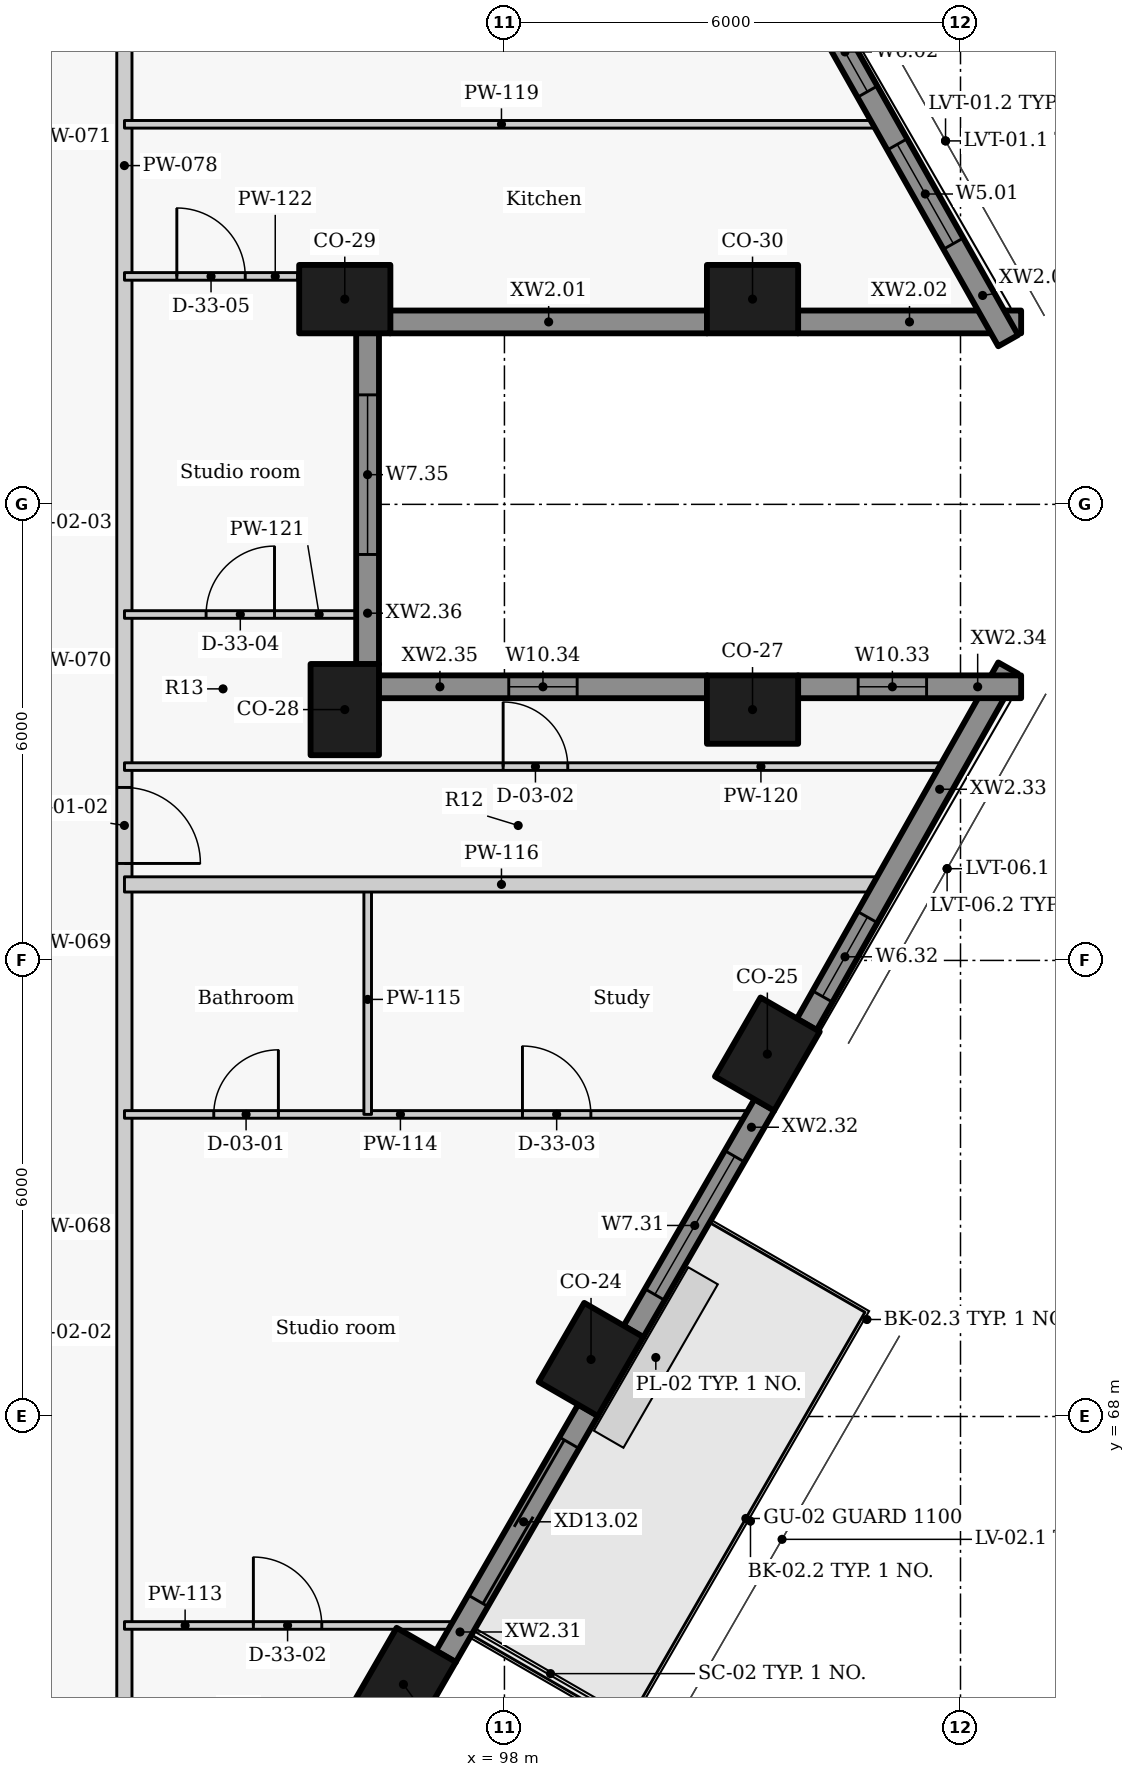
"""IFC4 building model, lengths in metres.
Left out: names, types, materials, properties, quantities, classifications, styles, units other than length and angle.
Written with IfcOpenShell. Run it as: python <this file> out.ifc"""

import sys

from ifc_helpers import new_model, si_unit, direction, frame, frame_2d, origin, origin_2d, place, context, subcontext, project, spatial, rectangle, extrude, element, fill, save


model = new_model("IFC4")
c1 = context("Model", 3, precision=1e-05, world=origin(), true_north=direction((0.0, 1.0)))
c2 = subcontext(c1, "Body", "Model", "MODEL_VIEW")
j1 = project(units=[si_unit("LENGTHUNIT", "METRE"), si_unit("PLANEANGLEUNIT", "RADIAN")], contexts=[c1])
p1 = place(None, origin())
s1 = spatial("IfcSite", under=j1, at=p1, CompositionType="ELEMENT")
p2 = place(p1, origin())
s2 = spatial("IfcBuilding", under=s1, at=p2, CompositionType="ELEMENT")
p3 = place(p2, frame((0.0, 0.0, 183.3)))
s3 = spatial("IfcBuildingStorey", under=s2, at=p3, CompositionType="ELEMENT", Elevation=183.3)
for number, where, z_axis, x_axis in (
    (1, (96.671, 64.475, 0.0), (0.0, 0.0, 1.0), (0.5, 0.866, 0.0)),
    (2, (99.139, 68.75, 0.0), (0.0, 0.0, 1.0), (0.5, 0.866, 0.0)),
    (3, (101.459, 72.768, 0.0), (0.0, 0.0, 1.0), (0.5, 0.866, 0.0)),
    (4, (101.264, 77.3, 0.0), (0.0, 0.0, 1.0), (-1.0, 0.0, 0.0)),
    (5, (95.899, 77.3, 0.0), (0.0, 0.0, 1.0), (0.0, 1.0, 0.0)),
    (6, (95.899, 82.7, 0.0), (0.0, 0.0, 1.0), (1.0, 0.0, 0.0)),
    (7, (101.264, 82.7, 0.0), (0.0, 0.0, 1.0), (1.0, 0.0, 0.0)),
):
    element("IfcColumn", number, at=place(p3, frame(where, z_axis=z_axis, x_axis=x_axis)), inside=s3, PredefinedType="COLUMN", context=c2, shape_type="SweptSolid", body=[
        extrude(rectangle(XDim=1.2, YDim=0.9, at=origin_2d()), origin(), (0.0, 0.0, 1.0), 3.3),
    ])
p4 = place(p3, frame((96.496, 82.4, 0.0), z_axis=(0.0, 0.0, 1.0), x_axis=(1.0, 0.0, 0.0)))
e8 = element("IfcWall", 8, at=p4, inside=s3, PredefinedType="SOLIDWALL", context=c2, shape_type="SweptSolid", body=[
    extrude(rectangle(XDim=4.172, YDim=0.3, at=frame_2d((2.086, 0.0))), origin(), (0.0, 0.0, 1.0), 2.425),
])
p5 = place(p3, frame((101.86, 82.4, 0.0), z_axis=(0.0, 0.0, 1.0), x_axis=(1.0, 0.0, 0.0)))
e9 = element("IfcWall", 9, at=p5, inside=s3, PredefinedType="SOLIDWALL", context=c2, shape_type="SweptSolid", body=[
    extrude(rectangle(XDim=2.938, YDim=0.3, at=frame_2d((1.469, 0.0))), origin(), (0.0, 0.0, 1.0), 2.425),
])
p6 = place(p3, frame((104.627, 82.154, 0.0), z_axis=(0.0, 0.0, 1.0), x_axis=(-0.492033360928, 0.870576344575, 0.0)))
e10 = element("IfcWall", 10, at=p6, inside=s3, PredefinedType="SOLIDWALL", context=c2, shape_type="SweptSolid", body=[
    extrude(rectangle(XDim=5.387, YDim=0.3, at=frame_2d((2.693, 0.0))), origin(), (0.0, 0.0, 1.0), 2.425),
])
p7 = place(p6, frame((1.466, 0.0, 0.9)))
e11 = element("IfcOpeningElement", 11, at=p7, cuts=e10, PredefinedType="OPENING", context=c2, shape_type="SweptSolid", body=[
    extrude(rectangle(XDim=1.5, YDim=1.1, at=frame_2d((0.75, 0.55))), frame((0.0, 0.16, 0.0), z_axis=(0.0, -1.0, 0.0), x_axis=(1.0, 0.0, 0.0)), (0.0, 0.0, 1.0), 0.32),
])
p8 = place(p6, frame((3.763, 0.0, 0.9)))
e12 = element("IfcOpeningElement", 12, at=p8, cuts=e10, PredefinedType="OPENING", context=c2, shape_type="SweptSolid", body=[
    extrude(rectangle(XDim=1.2, YDim=1.1, at=frame_2d((0.6, 0.55))), frame((0.0, 0.16, 0.0), z_axis=(0.0, -1.0, 0.0), x_axis=(1.0, 0.0, 0.0)), (0.0, 0.0, 1.0), 0.32),
])
p9 = place(p3, frame((97.229, 64.842, 0.0), z_axis=(0.0, 0.0, 1.0), x_axis=(0.500059225181, 0.86599120741, 0.0)))
e13 = element("IfcWall", 13, at=p9, inside=s3, PredefinedType="SOLIDWALL", context=c2, shape_type="SweptSolid", body=[
    extrude(rectangle(XDim=3.744, YDim=0.3, at=frame_2d((1.872, 0.0))), origin(), (0.0, 0.0, 1.0), 2.425),
])
p10 = place(p9, frame((0.847, 0.0, 0.0)))
e14 = element("IfcOpeningElement", 14, at=p10, cuts=e13, PredefinedType="OPENING", context=c2, shape_type="SweptSolid", body=[
    extrude(rectangle(XDim=2.4, YDim=2.0, at=frame_2d((1.2, 1.0))), frame((0.0, 0.16, 0.0), z_axis=(0.0, -1.0, 0.0), x_axis=(1.0, 0.0, 0.0)), (0.0, 0.0, 1.0), 0.32),
])
p11 = place(p3, frame((99.697, 69.116, 0.0), z_axis=(0.0, 0.0, 1.0), x_axis=(0.499955427682, 0.866051136095, 0.0)))
e15 = element("IfcWall", 15, at=p11, inside=s3, PredefinedType="SOLIDWALL", context=c2, shape_type="SweptSolid", body=[
    extrude(rectangle(XDim=3.447, YDim=0.3, at=frame_2d((1.724, 0.0))), origin(), (0.0, 0.0, 1.0), 2.425),
])
p12 = place(p11, frame((0.563, 0.0, 0.9)))
e16 = element("IfcOpeningElement", 16, at=p12, cuts=e15, PredefinedType="OPENING", context=c2, shape_type="SweptSolid", body=[
    extrude(rectangle(XDim=2.1, YDim=1.1, at=frame_2d((1.05, 0.55))), frame((0.0, 0.16, 0.0), z_axis=(0.0, -1.0, 0.0), x_axis=(1.0, 0.0, 0.0)), (0.0, 0.0, 1.0), 0.32),
])
p13 = place(p3, frame((101.977, 73.157, 0.0), z_axis=(0.0, 0.0, 1.0), x_axis=(0.492033360928, 0.870576344575, 0.0)))
e17 = element("IfcWall", 17, at=p13, inside=s3, PredefinedType="SOLIDWALL", context=c2, shape_type="SweptSolid", body=[
    extrude(rectangle(XDim=5.387, YDim=0.3, at=frame_2d((2.693, 0.0))), origin(), (0.0, 0.0, 1.0), 2.425),
])
p14 = place(p13, frame((0.423, 0.0, 0.9)))
e18 = element("IfcOpeningElement", 18, at=p14, cuts=e17, PredefinedType="OPENING", context=c2, shape_type="SweptSolid", body=[
    extrude(rectangle(XDim=1.2, YDim=1.1, at=frame_2d((0.6, 0.55))), frame((0.0, 0.16, 0.0), z_axis=(0.0, -1.0, 0.0), x_axis=(1.0, 0.0, 0.0)), (0.0, 0.0, 1.0), 0.32),
])
p15 = place(p3, frame((104.798, 77.6, 0.0), z_axis=(0.0, 0.0, 1.0), x_axis=(-1.0, 0.0, 0.0)))
e19 = element("IfcWall", 19, at=p15, inside=s3, PredefinedType="SOLIDWALL", context=c2, shape_type="SweptSolid", body=[
    extrude(rectangle(XDim=2.938, YDim=0.3, at=frame_2d((1.469, 0.0))), origin(), (0.0, 0.0, 1.0), 2.425),
])
p16 = place(p15, frame((1.244, 0.0, 1.5)))
e20 = element("IfcOpeningElement", 20, at=p16, cuts=e19, PredefinedType="OPENING", context=c2, shape_type="SweptSolid", body=[
    extrude(rectangle(XDim=0.9, YDim=0.5, at=frame_2d((0.45, 0.25))), frame((0.0, 0.16, 0.0), z_axis=(0.0, -1.0, 0.0), x_axis=(1.0, 0.0, 0.0)), (0.0, 0.0, 1.0), 0.32),
])
p17 = place(p3, frame((100.668, 77.6, 0.0), z_axis=(0.0, 0.0, 1.0), x_axis=(-1.0, 0.0, 0.0)))
e21 = element("IfcWall", 21, at=p17, inside=s3, PredefinedType="SOLIDWALL", context=c2, shape_type="SweptSolid", body=[
    extrude(rectangle(XDim=4.323, YDim=0.3, at=frame_2d((2.161, 0.0))), origin(), (0.0, 0.0, 1.0), 2.425),
])
p18 = place(p17, frame((1.711, 0.0, 1.5)))
e22 = element("IfcOpeningElement", 22, at=p18, cuts=e21, PredefinedType="OPENING", context=c2, shape_type="SweptSolid", body=[
    extrude(rectangle(XDim=0.9, YDim=0.5, at=frame_2d((0.45, 0.25))), frame((0.0, 0.16, 0.0), z_axis=(0.0, -1.0, 0.0), x_axis=(1.0, 0.0, 0.0)), (0.0, 0.0, 1.0), 0.32),
])
p19 = place(p3, frame((96.199, 77.896, 0.0), z_axis=(0.0, 0.0, 1.0), x_axis=(0.0, 1.0, 0.0)))
e23 = element("IfcWall", 23, at=p19, inside=s3, PredefinedType="SOLIDWALL", context=c2, shape_type="SweptSolid", body=[
    extrude(rectangle(XDim=4.358, YDim=0.3, at=frame_2d((2.179, 0.0))), origin(), (0.0, 0.0, 1.0), 2.425),
])
p20 = place(p19, frame((1.445, 0.0, 0.9)))
e24 = element("IfcOpeningElement", 24, at=p20, cuts=e23, PredefinedType="OPENING", context=c2, shape_type="SweptSolid", body=[
    extrude(rectangle(XDim=2.1, YDim=1.1, at=frame_2d((1.05, 0.55))), frame((0.0, 0.16, 0.0), z_axis=(0.0, -1.0, 0.0), x_axis=(1.0, 0.0, 0.0)), (0.0, 0.0, 1.0), 0.32),
])
p21 = place(p3, frame((93.0, 101.281, 0.0), z_axis=(0.0, 0.0, 1.0), x_axis=(0.0, -1.0, 0.0)))
e25 = element("IfcWall", 25, at=p21, inside=s3, PredefinedType="PARTITIONING", context=c2, shape_type="SweptSolid", body=[
    extrude(rectangle(XDim=42.606, YDim=0.2, at=frame_2d((21.303, 0.0))), origin(), (0.0, 0.0, 1.0), 2.405),
])
p22 = place(p21, frame((39.33, 0.0, 0.0)))
e26 = element("IfcOpeningElement", 26, at=p22, cuts=e25, PredefinedType="OPENING", context=c2, shape_type="SweptSolid", body=[
    extrude(rectangle(XDim=1.0, YDim=2.1, at=frame_2d((0.5, 1.05))), frame((0.0, 0.11, 0.0), z_axis=(0.0, -1.0, 0.0), x_axis=(1.0, 0.0, 0.0)), (0.0, 0.0, 1.0), 0.22),
])
p23 = place(p21, frame((25.005, 0.0, 0.0)))
e27 = element("IfcOpeningElement", 27, at=p23, cuts=e25, PredefinedType="OPENING", context=c2, shape_type="SweptSolid", body=[
    extrude(rectangle(XDim=1.0, YDim=2.1, at=frame_2d((0.5, 1.05))), frame((0.0, 0.11, 0.0), z_axis=(0.0, -1.0, 0.0), x_axis=(1.0, 0.0, 0.0)), (0.0, 0.0, 1.0), 0.22),
])
p24 = place(p21, frame((7.643, 0.0, 0.0)))
e28 = element("IfcOpeningElement", 28, at=p24, cuts=e25, PredefinedType="OPENING", context=c2, shape_type="SweptSolid", body=[
    extrude(rectangle(XDim=1.0, YDim=2.1, at=frame_2d((0.5, 1.05))), frame((0.0, 0.11, 0.0), z_axis=(0.0, -1.0, 0.0), x_axis=(1.0, 0.0, 0.0)), (0.0, 0.0, 1.0), 0.22),
])
p25 = place(p3, frame((93.001, 65.251, 0.0), z_axis=(0.0, 0.0, 1.0), x_axis=(1.0, 0.0, 0.0)))
e29 = element("IfcWall", 29, at=p25, inside=s3, PredefinedType="PARTITIONING", context=c2, shape_type="SweptSolid", body=[
    extrude(rectangle(XDim=4.291, YDim=0.1, at=frame_2d((2.146, 0.0))), origin(), (0.0, 0.0, 1.0), 2.405),
])
p26 = place(p25, frame((1.696, 0.0, 0.0)))
e30 = element("IfcOpeningElement", 30, at=p26, cuts=e29, PredefinedType="OPENING", context=c2, shape_type="SweptSolid", body=[
    extrude(rectangle(XDim=0.9, YDim=2.1, at=frame_2d((0.45, 1.05))), frame((0.0, 0.06, 0.0), z_axis=(0.0, -1.0, 0.0), x_axis=(1.0, 0.0, 0.0)), (0.0, 0.0, 1.0), 0.12),
])
p27 = place(p3, frame((93.001, 71.974, 0.0), z_axis=(0.0, 0.0, 1.0), x_axis=(1.0, 0.0, 0.0)))
e31 = element("IfcWall", 31, at=p27, inside=s3, PredefinedType="PARTITIONING", context=c2, shape_type="SweptSolid", body=[
    extrude(rectangle(XDim=8.173, YDim=0.1, at=frame_2d((4.086, 0.0))), origin(), (0.0, 0.0, 1.0), 2.405),
])
p28 = place(p27, frame((1.175, 0.0, 0.0)))
e32 = element("IfcOpeningElement", 32, at=p28, cuts=e31, PredefinedType="OPENING", context=c2, shape_type="SweptSolid", body=[
    extrude(rectangle(XDim=0.85, YDim=2.1, at=frame_2d((0.425, 1.05))), frame((0.0, 0.06, 0.0), z_axis=(0.0, -1.0, 0.0), x_axis=(1.0, 0.0, 0.0)), (0.0, 0.0, 1.0), 0.12),
])
p29 = place(p27, frame((5.236, 0.0, 0.0)))
e33 = element("IfcOpeningElement", 33, at=p29, cuts=e31, PredefinedType="OPENING", context=c2, shape_type="SweptSolid", body=[
    extrude(rectangle(XDim=0.9, YDim=2.1, at=frame_2d((0.45, 1.05))), frame((0.0, 0.06, 0.0), z_axis=(0.0, -1.0, 0.0), x_axis=(1.0, 0.0, 0.0)), (0.0, 0.0, 1.0), 0.12),
])
p30 = place(p3, frame((96.201, 71.974, 0.0), z_axis=(0.0, 0.0, 1.0), x_axis=(0.0, 1.0, 0.0)))
e34 = element("IfcWall", 34, at=p30, inside=s3, PredefinedType="PARTITIONING", context=c2, shape_type="SweptSolid", body=[
    extrude(rectangle(XDim=3.026, YDim=0.1, at=frame_2d((1.513, 0.0))), origin(), (0.0, 0.0, 1.0), 3.025),
])
p31 = place(p3, frame((93.001, 75.0, 0.0), z_axis=(0.0, 0.0, 1.0), x_axis=(1.0, 0.0, 0.0)))
e35 = element("IfcWall", 35, at=p31, inside=s3, PredefinedType="PARTITIONING", context=c2, shape_type="SweptSolid", body=[
    extrude(rectangle(XDim=9.919, YDim=0.2, at=frame_2d((4.96, 0.0))), origin(), (0.0, 0.0, 1.0), 2.405),
])
p32 = place(p3, frame((93.001, 85.0, 0.0), z_axis=(0.0, 0.0, 1.0), x_axis=(1.0, 0.0, 0.0)))
e36 = element("IfcWall", 36, at=p32, inside=s3, PredefinedType="PARTITIONING", context=c2, shape_type="SweptSolid", body=[
    extrude(rectangle(XDim=9.92, YDim=0.1, at=frame_2d((4.96, 0.0))), origin(), (0.0, 0.0, 1.0), 2.405),
])
p33 = place(p3, frame((93.001, 76.55, 0.0), z_axis=(0.0, 0.0, 1.0), x_axis=(1.0, 0.0, 0.0)))
e37 = element("IfcWall", 37, at=p33, inside=s3, PredefinedType="PARTITIONING", context=c2, shape_type="SweptSolid", body=[
    extrude(rectangle(XDim=10.815, YDim=0.1, at=frame_2d((5.407, 0.0))), origin(), (0.0, 0.0, 1.0), 2.405),
])
p34 = place(p33, frame((4.982, 0.0, 0.0)))
e38 = element("IfcOpeningElement", 38, at=p34, cuts=e37, PredefinedType="OPENING", context=c2, shape_type="SweptSolid", body=[
    extrude(rectangle(XDim=0.85, YDim=2.1, at=frame_2d((0.425, 1.05))), frame((0.0, 0.06, 0.0), z_axis=(0.0, -1.0, 0.0), x_axis=(1.0, 0.0, 0.0)), (0.0, 0.0, 1.0), 0.12),
])
p35 = place(p3, frame((93.001, 78.551, 0.0), z_axis=(0.0, 0.0, 1.0), x_axis=(1.0, 0.0, 0.0)))
e39 = element("IfcWall", 39, at=p35, inside=s3, PredefinedType="PARTITIONING", context=c2, shape_type="SweptSolid", body=[
    extrude(rectangle(XDim=3.049, YDim=0.1, at=frame_2d((1.524, 0.0))), origin(), (0.0, 0.0, 1.0), 2.405),
])
p36 = place(p35, frame((1.074, 0.0, 0.0)))
e40 = element("IfcOpeningElement", 40, at=p36, cuts=e39, PredefinedType="OPENING", context=c2, shape_type="SweptSolid", body=[
    extrude(rectangle(XDim=0.9, YDim=2.1, at=frame_2d((0.45, 1.05))), frame((0.0, 0.06, 0.0), z_axis=(0.0, -1.0, 0.0), x_axis=(1.0, 0.0, 0.0)), (0.0, 0.0, 1.0), 0.12),
])
p37 = place(p3, frame((93.001, 82.999, 0.0), z_axis=(0.0, 0.0, 1.0), x_axis=(1.0, 0.0, 0.0)))
e41 = element("IfcWall", 41, at=p37, inside=s3, PredefinedType="PARTITIONING", context=c2, shape_type="SweptSolid", body=[
    extrude(rectangle(XDim=2.279, YDim=0.1, at=frame_2d((1.139, 0.0))), origin(), (0.0, 0.0, 1.0), 3.025),
])
p38 = place(p37, frame((0.689, 0.0, 0.0)))
e42 = element("IfcOpeningElement", 42, at=p38, cuts=e41, PredefinedType="OPENING", context=c2, shape_type="SweptSolid", body=[
    extrude(rectangle(XDim=0.9, YDim=2.1, at=frame_2d((0.45, 1.05))), frame((0.0, 0.06, 0.0), z_axis=(0.0, -1.0, 0.0), x_axis=(1.0, 0.0, 0.0)), (0.0, 0.0, 1.0), 0.12),
])
p39 = place(p7, origin())
e43 = element("IfcWindow", 43, at=p39, inside=s3, PartitioningType="SINGLE_PANEL", PredefinedType="WINDOW", context=c2, shape_type="SweptSolid", body=[
    extrude(rectangle(XDim=1.5, YDim=1.1, at=frame_2d((0.75, 0.55))), frame((0.0, 0.03, 0.0), z_axis=(0.0, -1.0, 0.0), x_axis=(1.0, 0.0, 0.0)), (0.0, 0.0, 1.0), 0.06),
])
fill(e11, e43)
p40 = place(p8, origin())
e44 = element("IfcWindow", 44, at=p40, inside=s3, PartitioningType="SINGLE_PANEL", PredefinedType="WINDOW", context=c2, shape_type="SweptSolid", body=[
    extrude(rectangle(XDim=1.2, YDim=1.1, at=frame_2d((0.6, 0.55))), frame((0.0, 0.03, 0.0), z_axis=(0.0, -1.0, 0.0), x_axis=(1.0, 0.0, 0.0)), (0.0, 0.0, 1.0), 0.06),
])
fill(e12, e44)
p41 = place(p10, origin())
e45 = element("IfcDoor", 45, at=p41, inside=s3, OperationType="DOUBLE_DOOR_SLIDING", PredefinedType="DOOR", context=c2, shape_type="SweptSolid", body=[
    extrude(rectangle(XDim=2.4, YDim=2.0, at=frame_2d((1.2, 1.0))), frame((0.0, 0.025, 0.0), z_axis=(0.0, -1.0, 0.0), x_axis=(1.0, 0.0, 0.0)), (0.0, 0.0, 1.0), 0.05),
])
fill(e14, e45)
p42 = place(p12, origin())
e46 = element("IfcWindow", 46, at=p42, inside=s3, PartitioningType="SINGLE_PANEL", PredefinedType="WINDOW", context=c2, shape_type="SweptSolid", body=[
    extrude(rectangle(XDim=2.1, YDim=1.1, at=frame_2d((1.05, 0.55))), frame((0.0, 0.03, 0.0), z_axis=(0.0, -1.0, 0.0), x_axis=(1.0, 0.0, 0.0)), (0.0, 0.0, 1.0), 0.06),
])
fill(e16, e46)
p43 = place(p14, origin())
e47 = element("IfcWindow", 47, at=p43, inside=s3, PartitioningType="SINGLE_PANEL", PredefinedType="WINDOW", context=c2, shape_type="SweptSolid", body=[
    extrude(rectangle(XDim=1.2, YDim=1.1, at=frame_2d((0.6, 0.55))), frame((0.0, 0.03, 0.0), z_axis=(0.0, -1.0, 0.0), x_axis=(1.0, 0.0, 0.0)), (0.0, 0.0, 1.0), 0.06),
])
fill(e18, e47)
p44 = place(p16, origin())
e48 = element("IfcWindow", 48, at=p44, inside=s3, PartitioningType="SINGLE_PANEL", PredefinedType="WINDOW", context=c2, shape_type="SweptSolid", body=[
    extrude(rectangle(XDim=0.9, YDim=0.5, at=frame_2d((0.45, 0.25))), frame((0.0, 0.03, 0.0), z_axis=(0.0, -1.0, 0.0), x_axis=(1.0, 0.0, 0.0)), (0.0, 0.0, 1.0), 0.06),
])
fill(e20, e48)
p45 = place(p18, origin())
e49 = element("IfcWindow", 49, at=p45, inside=s3, PartitioningType="SINGLE_PANEL", PredefinedType="WINDOW", context=c2, shape_type="SweptSolid", body=[
    extrude(rectangle(XDim=0.9, YDim=0.5, at=frame_2d((0.45, 0.25))), frame((0.0, 0.03, 0.0), z_axis=(0.0, -1.0, 0.0), x_axis=(1.0, 0.0, 0.0)), (0.0, 0.0, 1.0), 0.06),
])
fill(e22, e49)
p46 = place(p20, origin())
e50 = element("IfcWindow", 50, at=p46, inside=s3, PartitioningType="SINGLE_PANEL", PredefinedType="WINDOW", context=c2, shape_type="SweptSolid", body=[
    extrude(rectangle(XDim=2.1, YDim=1.1, at=frame_2d((1.05, 0.55))), frame((0.0, 0.03, 0.0), z_axis=(0.0, -1.0, 0.0), x_axis=(1.0, 0.0, 0.0)), (0.0, 0.0, 1.0), 0.06),
])
fill(e24, e50)
p47 = place(p26, origin())
e51 = element("IfcDoor", 51, at=p47, inside=s3, OperationType="SINGLE_SWING_LEFT", PredefinedType="DOOR", context=c2, shape_type="SweptSolid", body=[
    extrude(rectangle(XDim=0.9, YDim=2.1, at=frame_2d((0.45, 1.05))), frame((0.0, 0.025, 0.0), z_axis=(0.0, -1.0, 0.0), x_axis=(1.0, 0.0, 0.0)), (0.0, 0.0, 1.0), 0.05),
])
fill(e30, e51)
p48 = place(p28, origin())
e52 = element("IfcDoor", 52, at=p48, inside=s3, OperationType="SINGLE_SWING_RIGHT", PredefinedType="DOOR", context=c2, shape_type="SweptSolid", body=[
    extrude(rectangle(XDim=0.85, YDim=2.1, at=frame_2d((0.425, 1.05))), frame((0.0, 0.025, 0.0), z_axis=(0.0, -1.0, 0.0), x_axis=(1.0, 0.0, 0.0)), (0.0, 0.0, 1.0), 0.05),
])
fill(e32, e52)
p49 = place(p29, origin())
e53 = element("IfcDoor", 53, at=p49, inside=s3, OperationType="SINGLE_SWING_LEFT", PredefinedType="DOOR", context=c2, shape_type="SweptSolid", body=[
    extrude(rectangle(XDim=0.9, YDim=2.1, at=frame_2d((0.45, 1.05))), frame((0.0, 0.025, 0.0), z_axis=(0.0, -1.0, 0.0), x_axis=(1.0, 0.0, 0.0)), (0.0, 0.0, 1.0), 0.05),
])
fill(e33, e53)
p50 = place(p23, origin())
e54 = element("IfcDoor", 54, at=p50, inside=s3, OperationType="SINGLE_SWING_RIGHT", PredefinedType="DOOR", context=c2, shape_type="SweptSolid", body=[
    extrude(rectangle(XDim=1.0, YDim=2.1, at=frame_2d((0.5, 1.05))), frame((0.0, 0.025, 0.0), z_axis=(0.0, -1.0, 0.0), x_axis=(1.0, 0.0, 0.0)), (0.0, 0.0, 1.0), 0.05),
])
fill(e27, e54)
p51 = place(p34, origin())
e55 = element("IfcDoor", 55, at=p51, inside=s3, OperationType="SINGLE_SWING_LEFT", PredefinedType="DOOR", context=c2, shape_type="SweptSolid", body=[
    extrude(rectangle(XDim=0.85, YDim=2.1, at=frame_2d((0.425, 1.05))), frame((0.0, 0.025, 0.0), z_axis=(0.0, -1.0, 0.0), x_axis=(1.0, 0.0, 0.0)), (0.0, 0.0, 1.0), 0.05),
])
fill(e38, e55)
p52 = place(p36, origin())
e56 = element("IfcDoor", 56, at=p52, inside=s3, OperationType="SINGLE_SWING_RIGHT", PredefinedType="DOOR", context=c2, shape_type="SweptSolid", body=[
    extrude(rectangle(XDim=0.9, YDim=2.1, at=frame_2d((0.45, 1.05))), frame((0.0, 0.025, 0.0), z_axis=(0.0, -1.0, 0.0), x_axis=(1.0, 0.0, 0.0)), (0.0, 0.0, 1.0), 0.05),
])
fill(e40, e56)
p53 = place(p38, origin())
e57 = element("IfcDoor", 57, at=p53, inside=s3, OperationType="SINGLE_SWING_LEFT", PredefinedType="DOOR", context=c2, shape_type="SweptSolid", body=[
    extrude(rectangle(XDim=0.9, YDim=2.1, at=frame_2d((0.45, 1.05))), frame((0.0, 0.025, 0.0), z_axis=(0.0, -1.0, 0.0), x_axis=(1.0, 0.0, 0.0)), (0.0, 0.0, 1.0), 0.05),
])
fill(e42, e57)
save(model, sys.argv[1])
